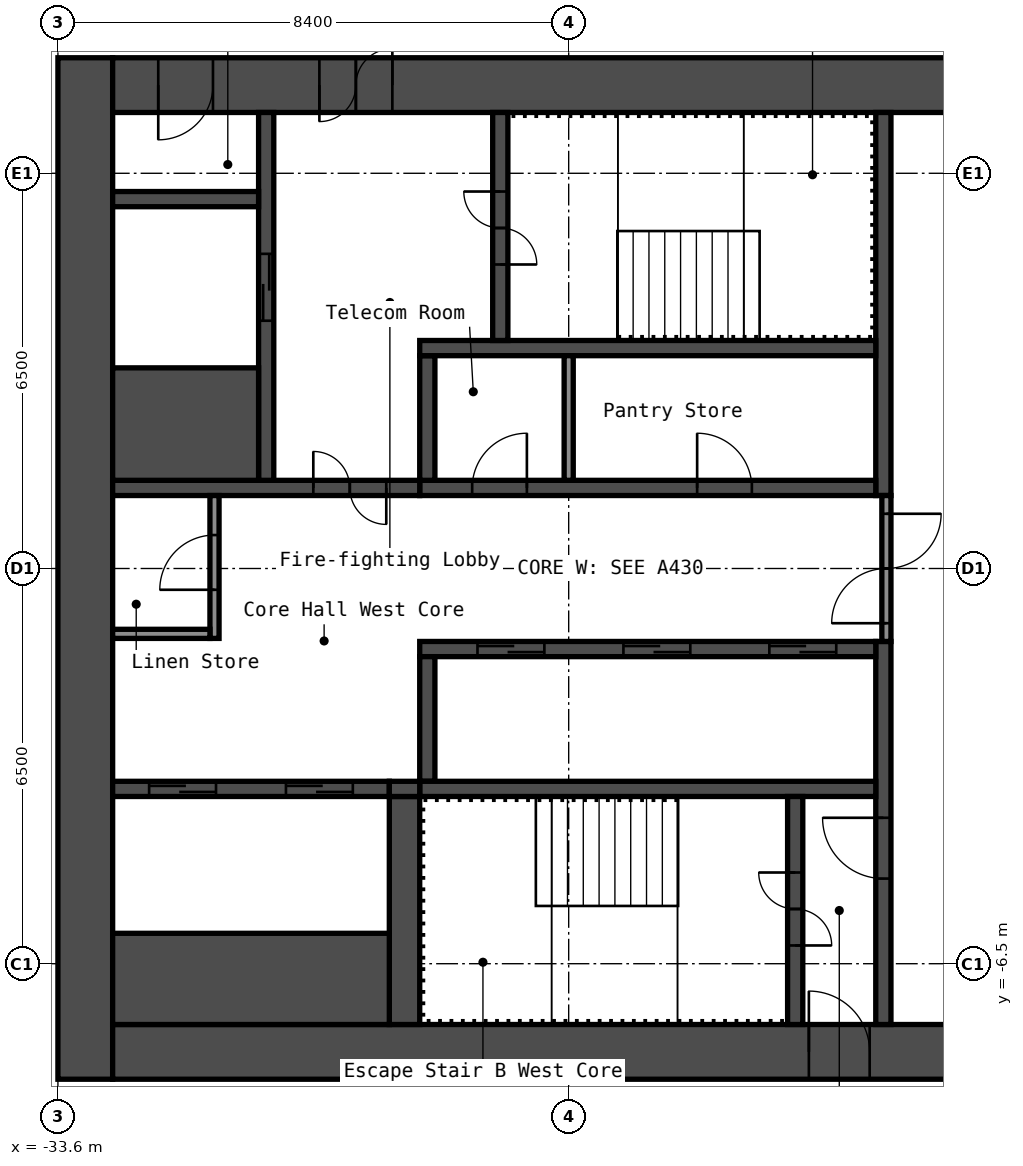
"""IFC4 building model, lengths in metres.
Left out: names, types, materials, properties, quantities, classifications, styles, units other than length and angle.
Written with IfcOpenShell. Run it as: python <this file> out.ifc"""

import sys

from ifc_helpers import new_model, si_unit, direction, frame, frame_2d, origin, place, context, subcontext, project, spatial, rectangle, extrude, element, fill, save


model = new_model("IFC4")
c1 = context("Model", 3, precision=1e-05, world=origin(), true_north=direction((0.0, 1.0)))
c2 = subcontext(c1, "Body", "Model", "MODEL_VIEW")
j1 = project(units=[si_unit("LENGTHUNIT", "METRE"), si_unit("PLANEANGLEUNIT", "RADIAN")], contexts=[c1])
p1 = place(None, origin())
s1 = spatial("IfcSite", under=j1, at=p1, CompositionType="ELEMENT")
p2 = place(p1, origin())
s2 = spatial("IfcBuilding", under=s1, at=p2, CompositionType="ELEMENT")
p3 = place(p2, frame((0.0, 0.0, 209.0)))
s3 = spatial("IfcBuildingStorey", under=s2, at=p3, CompositionType="ELEMENT", Elevation=209.0)
p4 = place(p3, frame((-33.15, -8.4, 0.0), z_axis=(0.0, 0.0, 1.0), x_axis=(0.0, 1.0, 0.0)))
e1 = element("IfcWall", 1, at=p4, inside=s3, PredefinedType="SHEAR", context=c2, shape_type="SweptSolid", body=[
    extrude(rectangle(XDim=16.8, YDim=0.9, at=frame_2d((8.4, 0.0))), origin(), (0.0, 0.0, 1.0), 2.75),
])
p5 = place(p3, frame((-32.7, 7.95, 0.0), z_axis=(0.0, 0.0, 1.0), x_axis=(1.0, 0.0, 0.0)))
e2 = element("IfcWall", 2, at=p5, inside=s3, PredefinedType="SHEAR", context=c2, shape_type="SweptSolid", body=[
    extrude(rectangle(XDim=15.0, YDim=0.9, at=frame_2d((7.5, 0.0))), origin(), (0.0, 0.0, 1.0), 2.75),
])
p6 = place(p5, frame((3.4, 0.0, 0.0)))
e3 = element("IfcOpeningElement", 3, at=p6, cuts=e2, PredefinedType="OPENING", context=c2, shape_type="SweptSolid", body=[
    extrude(rectangle(XDim=1.2, YDim=2.1, at=frame_2d((0.6, 1.05))), frame((0.0, 0.46, 0.0), z_axis=(0.0, -1.0, 0.0), x_axis=(1.0, 0.0, 0.0)), (0.0, 0.0, 1.0), 0.92),
])
p7 = place(p5, frame((0.75, 0.0, 0.0)))
e4 = element("IfcOpeningElement", 4, at=p7, cuts=e2, PredefinedType="OPENING", context=c2, shape_type="SweptSolid", body=[
    extrude(rectangle(XDim=0.9, YDim=2.1, at=frame_2d((0.45, 1.05))), frame((0.0, 0.46, 0.0), z_axis=(0.0, -1.0, 0.0), x_axis=(1.0, 0.0, 0.0)), (0.0, 0.0, 1.0), 0.92),
])
p8 = place(p3, frame((-32.7, -7.95, 0.0), z_axis=(0.0, 0.0, 1.0), x_axis=(1.0, 0.0, 0.0)))
e5 = element("IfcWall", 5, at=p8, inside=s3, PredefinedType="SHEAR", context=c2, shape_type="SweptSolid", body=[
    extrude(rectangle(XDim=15.0, YDim=0.9, at=frame_2d((7.5, 0.0))), origin(), (0.0, 0.0, 1.0), 2.75),
])
p9 = place(p8, frame((11.45, 0.0, 0.0)))
e6 = element("IfcOpeningElement", 6, at=p9, cuts=e5, PredefinedType="OPENING", context=c2, shape_type="SweptSolid", body=[
    extrude(rectangle(XDim=1.0, YDim=2.1, at=frame_2d((0.5, 1.05))), frame((0.0, 0.46, 0.0), z_axis=(0.0, -1.0, 0.0), x_axis=(1.0, 0.0, 0.0)), (0.0, 0.0, 1.0), 0.92),
])
p10 = place(p3, frame((-20.025, 1.2, 0.0), z_axis=(0.0, 0.0, 1.0), x_axis=(0.0, 1.0, 0.0)))
e7 = element("IfcWall", 7, at=p10, inside=s3, PredefinedType="SHEAR", context=c2, shape_type="SweptSolid", body=[
    extrude(rectangle(XDim=6.3, YDim=0.25, at=frame_2d((3.15, 0.0))), origin(), (0.0, 0.0, 1.0), 2.75),
])
p11 = place(p3, frame((-20.025, -7.5, 0.0), z_axis=(0.0, 0.0, 1.0), x_axis=(0.0, 1.0, 0.0)))
e8 = element("IfcWall", 8, at=p11, inside=s3, PredefinedType="SHEAR", context=c2, shape_type="SweptSolid", body=[
    extrude(rectangle(XDim=6.3, YDim=0.25, at=frame_2d((3.15, 0.0))), origin(), (0.0, 0.0, 1.0), 2.75),
])
p12 = place(p11, frame((2.4, 0.0, 0.0)))
e9 = element("IfcOpeningElement", 9, at=p12, cuts=e8, PredefinedType="OPENING", context=c2, shape_type="SweptSolid", body=[
    extrude(rectangle(XDim=1.0, YDim=2.1, at=frame_2d((0.5, 1.05))), frame((0.0, 0.135, 0.0), z_axis=(0.0, -1.0, 0.0), x_axis=(1.0, 0.0, 0.0)), (0.0, 0.0, 1.0), 0.27),
])
p13 = place(p3, frame((-27.65, 1.325, 0.0), z_axis=(0.0, 0.0, 1.0), x_axis=(1.0, 0.0, 0.0)))
e10 = element("IfcWall", 10, at=p13, inside=s3, PredefinedType="SHEAR", context=c2, shape_type="SweptSolid", body=[
    extrude(rectangle(XDim=7.5, YDim=0.25, at=frame_2d((3.75, 0.0))), origin(), (0.0, 0.0, 1.0), 2.75),
])
p14 = place(p13, frame((4.562, 0.0, 0.0)))
e11 = element("IfcOpeningElement", 11, at=p14, cuts=e10, PredefinedType="OPENING", context=c2, shape_type="SweptSolid", body=[
    extrude(rectangle(XDim=0.9, YDim=2.1, at=frame_2d((0.45, 1.05))), frame((0.0, 0.135, 0.0), z_axis=(0.0, -1.0, 0.0), x_axis=(1.0, 0.0, 0.0)), (0.0, 0.0, 1.0), 0.27),
])
p15 = place(p13, frame((0.863, 0.0, 0.0)))
e12 = element("IfcOpeningElement", 12, at=p15, cuts=e10, PredefinedType="OPENING", context=c2, shape_type="SweptSolid", body=[
    extrude(rectangle(XDim=0.9, YDim=2.1, at=frame_2d((0.45, 1.05))), frame((0.0, 0.135, 0.0), z_axis=(0.0, -1.0, 0.0), x_axis=(1.0, 0.0, 0.0)), (0.0, 0.0, 1.0), 0.27),
])
p16 = place(p3, frame((-27.525, 1.45, 0.0), z_axis=(0.0, 0.0, 1.0), x_axis=(0.0, 1.0, 0.0)))
e13 = element("IfcWall", 13, at=p16, inside=s3, PredefinedType="SHEAR", context=c2, shape_type="SweptSolid", body=[
    extrude(rectangle(XDim=2.05, YDim=0.25, at=frame_2d((1.025, 0.0))), origin(), (0.0, 0.0, 1.0), 2.75),
])
p17 = place(p3, frame((-27.65, 3.625, 0.0), z_axis=(0.0, 0.0, 1.0), x_axis=(1.0, 0.0, 0.0)))
e14 = element("IfcWall", 14, at=p17, inside=s3, PredefinedType="SHEAR", context=c2, shape_type="SweptSolid", body=[
    extrude(rectangle(XDim=7.5, YDim=0.25, at=frame_2d((3.75, 0.0))), origin(), (0.0, 0.0, 1.0), 2.75),
])
p18 = place(p3, frame((-26.325, 3.75, 0.0), z_axis=(0.0, 0.0, 1.0), x_axis=(0.0, 1.0, 0.0)))
e15 = element("IfcWall", 15, at=p18, inside=s3, PredefinedType="SHEAR", context=c2, shape_type="SweptSolid", body=[
    extrude(rectangle(XDim=3.75, YDim=0.25, at=frame_2d((1.875, 0.0))), origin(), (0.0, 0.0, 1.0), 2.75),
])
p19 = place(p18, frame((1.25, 0.0, 0.0)))
e16 = element("IfcOpeningElement", 16, at=p19, cuts=e15, PredefinedType="OPENING", context=c2, shape_type="SweptSolid", body=[
    extrude(rectangle(XDim=1.2, YDim=2.1, at=frame_2d((0.6, 1.05))), frame((0.0, 0.135, 0.0), z_axis=(0.0, -1.0, 0.0), x_axis=(1.0, 0.0, 0.0)), (0.0, 0.0, 1.0), 0.27),
])
p20 = place(p3, frame((-32.7, 1.325, 0.0), z_axis=(0.0, 0.0, 1.0), x_axis=(1.0, 0.0, 0.0)))
e17 = element("IfcWall", 17, at=p20, inside=s3, PredefinedType="SHEAR", context=c2, shape_type="SweptSolid", body=[
    extrude(rectangle(XDim=5.05, YDim=0.25, at=frame_2d((2.525, 0.0))), origin(), (0.0, 0.0, 1.0), 2.75),
])
p21 = place(p20, frame((3.3, 0.0, 0.0)))
e18 = element("IfcOpeningElement", 18, at=p21, cuts=e17, PredefinedType="OPENING", context=c2, shape_type="SweptSolid", body=[
    extrude(rectangle(XDim=1.2, YDim=2.1, at=frame_2d((0.6, 1.05))), frame((0.0, 0.135, 0.0), z_axis=(0.0, -1.0, 0.0), x_axis=(1.0, 0.0, 0.0)), (0.0, 0.0, 1.0), 0.27),
])
p22 = place(p3, frame((-30.175, 1.45, 0.0), z_axis=(0.0, 0.0, 1.0), x_axis=(0.0, 1.0, 0.0)))
e19 = element("IfcWall", 19, at=p22, inside=s3, PredefinedType="SHEAR", context=c2, shape_type="SweptSolid", body=[
    extrude(rectangle(XDim=6.05, YDim=0.25, at=frame_2d((3.025, 0.0))), origin(), (0.0, 0.0, 1.0), 2.75),
])
p23 = place(p22, frame((2.625, 0.0, 0.0)))
e20 = element("IfcOpeningElement", 20, at=p23, cuts=e19, PredefinedType="OPENING", context=c2, shape_type="SweptSolid", body=[
    extrude(rectangle(XDim=1.1, YDim=2.1, at=frame_2d((0.55, 1.05))), frame((0.0, 0.135, 0.0), z_axis=(0.0, -1.0, 0.0), x_axis=(1.0, 0.0, 0.0)), (0.0, 0.0, 1.0), 0.27),
])
p24 = place(p3, frame((-32.7, 2.375, 0.0), z_axis=(0.0, 0.0, 1.0), x_axis=(1.0, 0.0, 0.0)))
e21 = element("IfcWall", 21, at=p24, inside=s3, PredefinedType="SHEAR", context=c2, shape_type="SweptSolid", body=[
    extrude(rectangle(XDim=2.4, YDim=1.85, at=frame_2d((1.2, 0.0))), origin(), (0.0, 0.0, 1.0), 2.75),
])
p25 = place(p3, frame((-32.7, 6.075, 0.0), z_axis=(0.0, 0.0, 1.0), x_axis=(1.0, 0.0, 0.0)))
e22 = element("IfcWall", 22, at=p25, inside=s3, PredefinedType="SHEAR", context=c2, shape_type="SweptSolid", body=[
    extrude(rectangle(XDim=2.4, YDim=0.25, at=frame_2d((1.2, 0.0))), origin(), (0.0, 0.0, 1.0), 2.75),
])
p26 = place(p3, frame((-27.65, -1.325, 0.0), z_axis=(0.0, 0.0, 1.0), x_axis=(1.0, 0.0, 0.0)))
e23 = element("IfcWall", 23, at=p26, inside=s3, PredefinedType="SHEAR", context=c2, shape_type="SweptSolid", body=[
    extrude(rectangle(XDim=7.5, YDim=0.25, at=frame_2d((3.75, 0.0))), origin(), (0.0, 0.0, 1.0), 2.75),
])
p27 = place(p26, frame((5.75, 0.0, 0.0)))
e24 = element("IfcOpeningElement", 24, at=p27, cuts=e23, PredefinedType="OPENING", context=c2, shape_type="SweptSolid", body=[
    extrude(rectangle(XDim=1.1, YDim=2.1, at=frame_2d((0.55, 1.05))), frame((0.0, 0.135, 0.0), z_axis=(0.0, -1.0, 0.0), x_axis=(1.0, 0.0, 0.0)), (0.0, 0.0, 1.0), 0.27),
])
p28 = place(p26, frame((3.35, 0.0, 0.0)))
e25 = element("IfcOpeningElement", 25, at=p28, cuts=e23, PredefinedType="OPENING", context=c2, shape_type="SweptSolid", body=[
    extrude(rectangle(XDim=1.1, YDim=2.1, at=frame_2d((0.55, 1.05))), frame((0.0, 0.135, 0.0), z_axis=(0.0, -1.0, 0.0), x_axis=(1.0, 0.0, 0.0)), (0.0, 0.0, 1.0), 0.27),
])
p29 = place(p26, frame((0.95, 0.0, 0.0)))
e26 = element("IfcOpeningElement", 26, at=p29, cuts=e23, PredefinedType="OPENING", context=c2, shape_type="SweptSolid", body=[
    extrude(rectangle(XDim=1.1, YDim=2.1, at=frame_2d((0.55, 1.05))), frame((0.0, 0.135, 0.0), z_axis=(0.0, -1.0, 0.0), x_axis=(1.0, 0.0, 0.0)), (0.0, 0.0, 1.0), 0.27),
])
p30 = place(p3, frame((-27.525, -3.5, 0.0), z_axis=(0.0, 0.0, 1.0), x_axis=(0.0, 1.0, 0.0)))
e27 = element("IfcWall", 27, at=p30, inside=s3, PredefinedType="SHEAR", context=c2, shape_type="SweptSolid", body=[
    extrude(rectangle(XDim=2.05, YDim=0.25, at=frame_2d((1.025, 0.0))), origin(), (0.0, 0.0, 1.0), 2.75),
])
p31 = place(p3, frame((-27.65, -3.625, 0.0), z_axis=(0.0, 0.0, 1.0), x_axis=(1.0, 0.0, 0.0)))
e28 = element("IfcWall", 28, at=p31, inside=s3, PredefinedType="SHEAR", context=c2, shape_type="SweptSolid", body=[
    extrude(rectangle(XDim=7.5, YDim=0.25, at=frame_2d((3.75, 0.0))), origin(), (0.0, 0.0, 1.0), 2.75),
])
p32 = place(p3, frame((-21.475, -7.5, 0.0), z_axis=(0.0, 0.0, 1.0), x_axis=(0.0, 1.0, 0.0)))
e29 = element("IfcWall", 29, at=p32, inside=s3, PredefinedType="SHEAR", context=c2, shape_type="SweptSolid", body=[
    extrude(rectangle(XDim=3.75, YDim=0.25, at=frame_2d((1.875, 0.0))), origin(), (0.0, 0.0, 1.0), 2.75),
])
p33 = place(p32, frame((1.3, 0.0, 0.0)))
e30 = element("IfcOpeningElement", 30, at=p33, cuts=e29, PredefinedType="OPENING", context=c2, shape_type="SweptSolid", body=[
    extrude(rectangle(XDim=1.2, YDim=2.1, at=frame_2d((0.6, 1.05))), frame((0.0, 0.135, 0.0), z_axis=(0.0, -1.0, 0.0), x_axis=(1.0, 0.0, 0.0)), (0.0, 0.0, 1.0), 0.27),
])
p34 = place(p3, frame((-27.9, -7.5, 0.0), z_axis=(0.0, 0.0, 1.0), x_axis=(0.0, 1.0, 0.0)))
e31 = element("IfcWall", 31, at=p34, inside=s3, PredefinedType="SHEAR", context=c2, shape_type="SweptSolid", body=[
    extrude(rectangle(XDim=3.75, YDim=0.5, at=frame_2d((1.875, 0.0))), origin(), (0.0, 0.0, 1.0), 2.75),
])
p35 = place(p3, frame((-32.7, -3.625, 0.0), z_axis=(0.0, 0.0, 1.0), x_axis=(1.0, 0.0, 0.0)))
e32 = element("IfcWall", 32, at=p35, inside=s3, PredefinedType="SHEAR", context=c2, shape_type="SweptSolid", body=[
    extrude(rectangle(XDim=4.55, YDim=0.25, at=frame_2d((2.275, 0.0))), origin(), (0.0, 0.0, 1.0), 2.75),
])
p36 = place(p35, frame((2.85, 0.0, 0.0)))
e33 = element("IfcOpeningElement", 33, at=p36, cuts=e32, PredefinedType="OPENING", context=c2, shape_type="SweptSolid", body=[
    extrude(rectangle(XDim=1.1, YDim=2.1, at=frame_2d((0.55, 1.05))), frame((0.0, 0.135, 0.0), z_axis=(0.0, -1.0, 0.0), x_axis=(1.0, 0.0, 0.0)), (0.0, 0.0, 1.0), 0.27),
])
p37 = place(p35, frame((0.6, 0.0, 0.0)))
e34 = element("IfcOpeningElement", 34, at=p37, cuts=e32, PredefinedType="OPENING", context=c2, shape_type="SweptSolid", body=[
    extrude(rectangle(XDim=1.1, YDim=2.1, at=frame_2d((0.55, 1.05))), frame((0.0, 0.135, 0.0), z_axis=(0.0, -1.0, 0.0), x_axis=(1.0, 0.0, 0.0)), (0.0, 0.0, 1.0), 0.27),
])
p38 = place(p3, frame((-32.7, -6.75, 0.0), z_axis=(0.0, 0.0, 1.0), x_axis=(1.0, 0.0, 0.0)))
e35 = element("IfcWall", 35, at=p38, inside=s3, PredefinedType="SHEAR", context=c2, shape_type="SweptSolid", body=[
    extrude(rectangle(XDim=4.55, YDim=1.5, at=frame_2d((2.275, 0.0))), origin(), (0.0, 0.0, 1.0), 2.75),
])
p39 = place(p3, frame((-28.15, -3.625, 0.0), z_axis=(0.0, 0.0, 1.0), x_axis=(1.0, 0.0, 0.0)))
e36 = element("IfcWall", 36, at=p39, inside=s3, PredefinedType="SHEAR", context=c2, shape_type="SweptSolid", body=[
    extrude(rectangle(XDim=0.5, YDim=0.25, at=frame_2d((0.25, 0.0))), origin(), (0.0, 0.0, 1.0), 2.75),
])
p40 = place(p3, frame((-19.975, -1.2, 0.0), z_axis=(0.0, 0.0, 1.0), x_axis=(0.0, 1.0, 0.0)))
e37 = element("IfcWall", 37, at=p40, inside=s3, PredefinedType="PARTITIONING", context=c2, shape_type="SweptSolid", body=[
    extrude(rectangle(XDim=2.4, YDim=0.15, at=frame_2d((1.2, 0.0))), origin(), (0.0, 0.0, 1.0), 2.75),
])
p41 = place(p40, frame((0.3, 0.0, 0.0)))
e38 = element("IfcOpeningElement", 38, at=p41, cuts=e37, PredefinedType="OPENING", context=c2, shape_type="SweptSolid", body=[
    extrude(rectangle(XDim=1.8, YDim=2.1, at=frame_2d((0.9, 1.05))), frame((0.0, 0.085, 0.0), z_axis=(0.0, -1.0, 0.0), x_axis=(1.0, 0.0, 0.0)), (0.0, 0.0, 1.0), 0.17),
])
p42 = place(p3, frame((-31.025, -1.15, 0.0), z_axis=(0.0, 0.0, 1.0), x_axis=(0.0, 1.0, 0.0)))
e39 = element("IfcWall", 39, at=p42, inside=s3, PredefinedType="PARTITIONING", context=c2, shape_type="SweptSolid", body=[
    extrude(rectangle(XDim=2.35, YDim=0.15, at=frame_2d((1.175, 0.0))), origin(), (0.0, 0.0, 1.0), 2.75),
])
p43 = place(p42, frame((0.8, 0.0, 0.0)))
e40 = element("IfcOpeningElement", 40, at=p43, cuts=e39, PredefinedType="OPENING", context=c2, shape_type="SweptSolid", body=[
    extrude(rectangle(XDim=0.9, YDim=2.1, at=frame_2d((0.45, 1.05))), frame((0.0, 0.085, 0.0), z_axis=(0.0, -1.0, 0.0), x_axis=(1.0, 0.0, 0.0)), (0.0, 0.0, 1.0), 0.17),
])
p44 = place(p3, frame((-32.7, -1.075, 0.0), z_axis=(0.0, 0.0, 1.0), x_axis=(1.0, 0.0, 0.0)))
e41 = element("IfcWall", 41, at=p44, inside=s3, PredefinedType="PARTITIONING", context=c2, shape_type="SweptSolid", body=[
    extrude(rectangle(XDim=1.6, YDim=0.15, at=frame_2d((0.8, 0.0))), origin(), (0.0, 0.0, 1.0), 2.75),
])
p45 = place(p3, frame((-25.2, 1.45, 0.0), z_axis=(0.0, 0.0, 1.0), x_axis=(0.0, 1.0, 0.0)))
e42 = element("IfcWall", 42, at=p45, inside=s3, PredefinedType="PARTITIONING", context=c2, shape_type="SweptSolid", body=[
    extrude(rectangle(XDim=2.05, YDim=0.15, at=frame_2d((1.025, 0.0))), origin(), (0.0, 0.0, 1.0), 2.75),
])
p46 = place(p6, origin())
e43 = element("IfcDoor", 43, at=p46, inside=s3, OperationType="DOUBLE_DOOR_SINGLE_SWING", PredefinedType="DOOR", context=c2, shape_type="SweptSolid", body=[
    extrude(rectangle(XDim=1.2, YDim=2.1, at=frame_2d((0.6, 1.05))), frame((0.0, 0.025, 0.0), z_axis=(0.0, -1.0, 0.0), x_axis=(1.0, 0.0, 0.0)), (0.0, 0.0, 1.0), 0.05),
])
fill(e3, e43)
p47 = place(p7, origin())
e44 = element("IfcDoor", 44, at=p47, inside=s3, OperationType="SINGLE_SWING_LEFT", PredefinedType="DOOR", context=c2, shape_type="SweptSolid", body=[
    extrude(rectangle(XDim=0.9, YDim=2.1, at=frame_2d((0.45, 1.05))), frame((0.0, 0.025, 0.0), z_axis=(0.0, -1.0, 0.0), x_axis=(1.0, 0.0, 0.0)), (0.0, 0.0, 1.0), 0.05),
])
fill(e4, e44)
p48 = place(p9, origin())
e45 = element("IfcDoor", 45, at=p48, inside=s3, OperationType="SINGLE_SWING_RIGHT", PredefinedType="DOOR", context=c2, shape_type="SweptSolid", body=[
    extrude(rectangle(XDim=1.0, YDim=2.1, at=frame_2d((0.5, 1.05))), frame((0.0, 0.025, 0.0), z_axis=(0.0, -1.0, 0.0), x_axis=(1.0, 0.0, 0.0)), (0.0, 0.0, 1.0), 0.05),
])
fill(e6, e45)
p49 = place(p19, origin())
e46 = element("IfcDoor", 46, at=p49, inside=s3, OperationType="DOUBLE_DOOR_SINGLE_SWING", PredefinedType="DOOR", context=c2, shape_type="SweptSolid", body=[
    extrude(rectangle(XDim=1.2, YDim=2.1, at=frame_2d((0.6, 1.05))), frame((0.0, 0.025, 0.0), z_axis=(0.0, -1.0, 0.0), x_axis=(1.0, 0.0, 0.0)), (0.0, 0.0, 1.0), 0.05),
])
fill(e16, e46)
p50 = place(p33, origin())
e47 = element("IfcDoor", 47, at=p50, inside=s3, OperationType="DOUBLE_DOOR_SINGLE_SWING", PredefinedType="DOOR", context=c2, shape_type="SweptSolid", body=[
    extrude(rectangle(XDim=1.2, YDim=2.1, at=frame_2d((0.6, 1.05))), frame((0.0, 0.025, 0.0), z_axis=(0.0, -1.0, 0.0), x_axis=(1.0, 0.0, 0.0)), (0.0, 0.0, 1.0), 0.05),
])
fill(e30, e47)
p51 = place(p12, origin())
e48 = element("IfcDoor", 48, at=p51, inside=s3, OperationType="SINGLE_SWING_LEFT", PredefinedType="DOOR", context=c2, shape_type="SweptSolid", body=[
    extrude(rectangle(XDim=1.0, YDim=2.1, at=frame_2d((0.5, 1.05))), frame((0.0, 0.025, 0.0), z_axis=(0.0, -1.0, 0.0), x_axis=(1.0, 0.0, 0.0)), (0.0, 0.0, 1.0), 0.05),
])
fill(e9, e48)
p52 = place(p21, origin())
e49 = element("IfcDoor", 49, at=p52, inside=s3, OperationType="DOUBLE_DOOR_SINGLE_SWING", PredefinedType="DOOR", context=c2, shape_type="SweptSolid", body=[
    extrude(rectangle(XDim=1.2, YDim=2.1, at=frame_2d((0.6, 1.05))), frame((0.0, 0.025, 0.0), z_axis=(0.0, -1.0, 0.0), x_axis=(1.0, 0.0, 0.0)), (0.0, 0.0, 1.0), 0.05),
])
fill(e18, e49)
p53 = place(p41, origin())
e50 = element("IfcDoor", 50, at=p53, inside=s3, OperationType="DOUBLE_DOOR_SINGLE_SWING", PredefinedType="DOOR", context=c2, shape_type="SweptSolid", body=[
    extrude(rectangle(XDim=1.8, YDim=2.1, at=frame_2d((0.9, 1.05))), frame((0.0, 0.025, 0.0), z_axis=(0.0, -1.0, 0.0), x_axis=(1.0, 0.0, 0.0)), (0.0, 0.0, 1.0), 0.05),
])
fill(e38, e50)
p54 = place(p43, origin())
e51 = element("IfcDoor", 51, at=p54, inside=s3, OperationType="SINGLE_SWING_RIGHT", PredefinedType="DOOR", context=c2, shape_type="SweptSolid", body=[
    extrude(rectangle(XDim=0.9, YDim=2.1, at=frame_2d((0.45, 1.05))), frame((0.0, 0.025, 0.0), z_axis=(0.0, -1.0, 0.0), x_axis=(1.0, 0.0, 0.0)), (0.0, 0.0, 1.0), 0.05),
])
fill(e40, e51)
p55 = place(p14, origin())
e52 = element("IfcDoor", 52, at=p55, inside=s3, OperationType="SINGLE_SWING_RIGHT", PredefinedType="DOOR", context=c2, shape_type="SweptSolid", body=[
    extrude(rectangle(XDim=0.9, YDim=2.1, at=frame_2d((0.45, 1.05))), frame((0.0, 0.025, 0.0), z_axis=(0.0, -1.0, 0.0), x_axis=(1.0, 0.0, 0.0)), (0.0, 0.0, 1.0), 0.05),
])
fill(e11, e52)
p56 = place(p15, origin())
e53 = element("IfcDoor", 53, at=p56, inside=s3, OperationType="SINGLE_SWING_LEFT", PredefinedType="DOOR", context=c2, shape_type="SweptSolid", body=[
    extrude(rectangle(XDim=0.9, YDim=2.1, at=frame_2d((0.45, 1.05))), frame((0.0, 0.025, 0.0), z_axis=(0.0, -1.0, 0.0), x_axis=(1.0, 0.0, 0.0)), (0.0, 0.0, 1.0), 0.05),
])
fill(e12, e53)
p57 = place(p27, origin())
e54 = element("IfcDoor", 54, at=p57, inside=s3, OperationType="DOUBLE_DOOR_SLIDING", PredefinedType="DOOR", context=c2, shape_type="SweptSolid", body=[
    extrude(rectangle(XDim=1.1, YDim=2.1, at=frame_2d((0.55, 1.05))), frame((0.0, 0.025, 0.0), z_axis=(0.0, -1.0, 0.0), x_axis=(1.0, 0.0, 0.0)), (0.0, 0.0, 1.0), 0.05),
])
fill(e24, e54)
p58 = place(p28, origin())
e55 = element("IfcDoor", 55, at=p58, inside=s3, OperationType="DOUBLE_DOOR_SLIDING", PredefinedType="DOOR", context=c2, shape_type="SweptSolid", body=[
    extrude(rectangle(XDim=1.1, YDim=2.1, at=frame_2d((0.55, 1.05))), frame((0.0, 0.025, 0.0), z_axis=(0.0, -1.0, 0.0), x_axis=(1.0, 0.0, 0.0)), (0.0, 0.0, 1.0), 0.05),
])
fill(e25, e55)
p59 = place(p29, origin())
e56 = element("IfcDoor", 56, at=p59, inside=s3, OperationType="DOUBLE_DOOR_SLIDING", PredefinedType="DOOR", context=c2, shape_type="SweptSolid", body=[
    extrude(rectangle(XDim=1.1, YDim=2.1, at=frame_2d((0.55, 1.05))), frame((0.0, 0.025, 0.0), z_axis=(0.0, -1.0, 0.0), x_axis=(1.0, 0.0, 0.0)), (0.0, 0.0, 1.0), 0.05),
])
fill(e26, e56)
p60 = place(p23, origin())
e57 = element("IfcDoor", 57, at=p60, inside=s3, OperationType="DOUBLE_DOOR_SLIDING", PredefinedType="DOOR", context=c2, shape_type="SweptSolid", body=[
    extrude(rectangle(XDim=1.1, YDim=2.1, at=frame_2d((0.55, 1.05))), frame((0.0, 0.025, 0.0), z_axis=(0.0, -1.0, 0.0), x_axis=(1.0, 0.0, 0.0)), (0.0, 0.0, 1.0), 0.05),
])
fill(e20, e57)
p61 = place(p36, origin())
e58 = element("IfcDoor", 58, at=p61, inside=s3, OperationType="DOUBLE_DOOR_SLIDING", PredefinedType="DOOR", context=c2, shape_type="SweptSolid", body=[
    extrude(rectangle(XDim=1.1, YDim=2.1, at=frame_2d((0.55, 1.05))), frame((0.0, 0.025, 0.0), z_axis=(0.0, -1.0, 0.0), x_axis=(1.0, 0.0, 0.0)), (0.0, 0.0, 1.0), 0.05),
])
fill(e33, e58)
p62 = place(p37, origin())
e59 = element("IfcDoor", 59, at=p62, inside=s3, OperationType="DOUBLE_DOOR_SLIDING", PredefinedType="DOOR", context=c2, shape_type="SweptSolid", body=[
    extrude(rectangle(XDim=1.1, YDim=2.1, at=frame_2d((0.55, 1.05))), frame((0.0, 0.025, 0.0), z_axis=(0.0, -1.0, 0.0), x_axis=(1.0, 0.0, 0.0)), (0.0, 0.0, 1.0), 0.05),
])
fill(e34, e59)
save(model, sys.argv[1])
